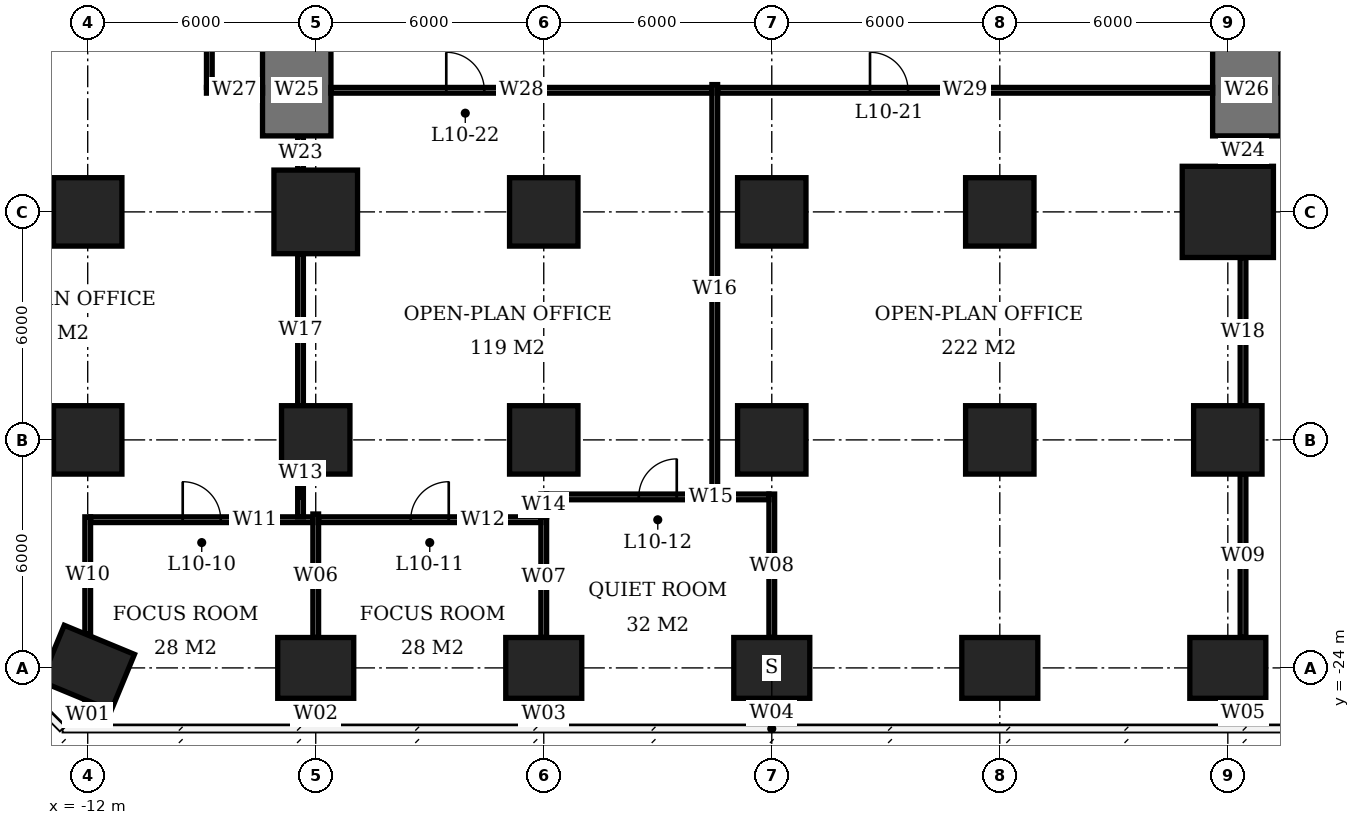
"""IFC4 building model, lengths in metres.
Left out: names, types, materials, properties, quantities, classifications, styles, units other than length and angle.
Written with IfcOpenShell. Run it as: python <this file> out.ifc"""

import sys

from ifc_helpers import new_model, si_unit, direction, frame, frame_2d, origin, origin_2d, place, context, subcontext, project, spatial, rectangle, extrude, element, fill, save


model = new_model("IFC4")
c1 = context("Model", 3, precision=1e-05, world=origin(), true_north=direction((0.0, 1.0)))
c2 = subcontext(c1, "Body", "Model", "MODEL_VIEW")
j1 = project(units=[si_unit("LENGTHUNIT", "METRE"), si_unit("PLANEANGLEUNIT", "RADIAN")], contexts=[c1])
p1 = place(None, origin())
s1 = spatial("IfcSite", under=j1, at=p1, CompositionType="ELEMENT")
p2 = place(p1, origin())
s2 = spatial("IfcBuilding", under=s1, at=p2, CompositionType="ELEMENT")
p3 = place(p2, frame((0.0, 0.0, 45.5)))
s3 = spatial("IfcBuildingStorey", under=s2, at=p3, CompositionType="ELEMENT", Elevation=45.5)
p4 = place(p3, frame((-12.0, -24.0, 0.0), z_axis=(0.0, 0.0, 1.0), x_axis=(-0.923879532511, 0.382683432365, 0.0)))
e1 = element("IfcColumn", 1, at=p4, inside=s3, PredefinedType="COLUMN", context=c2, shape_type="SweptSolid", body=[
    extrude(rectangle(XDim=2.0, YDim=1.6, at=origin_2d()), origin(), (0.0, 0.0, 1.0), 3.9),
])
for number, where, z_axis, x_axis in (
    (2, (-12.0, -18.0, 0.0), (0.0, 0.0, 1.0), (1.0, 0.0, 0.0)),
    (3, (-12.0, -12.0, 0.0), (0.0, 0.0, 1.0), (1.0, 0.0, 0.0)),
):
    element("IfcColumn", number, at=place(p3, frame(where, z_axis=z_axis, x_axis=x_axis)), inside=s3, PredefinedType="COLUMN", context=c2, shape_type="SweptSolid", body=[
        extrude(rectangle(XDim=1.8, YDim=1.8, at=origin_2d()), origin(), (0.0, 0.0, 1.0), 3.9),
    ])
p5 = place(p3, frame((-6.0, -24.0, 0.0), z_axis=(0.0, 0.0, 1.0), x_axis=(1.0, 0.0, 0.0)))
e4 = element("IfcColumn", 4, at=p5, inside=s3, PredefinedType="COLUMN", context=c2, shape_type="SweptSolid", body=[
    extrude(rectangle(XDim=2.0, YDim=1.6, at=origin_2d()), origin(), (0.0, 0.0, 1.0), 3.9),
])
p6 = place(p3, frame((-6.0, -18.0, 0.0), z_axis=(0.0, 0.0, 1.0), x_axis=(1.0, 0.0, 0.0)))
e5 = element("IfcColumn", 5, at=p6, inside=s3, PredefinedType="COLUMN", context=c2, shape_type="SweptSolid", body=[
    extrude(rectangle(XDim=1.8, YDim=1.8, at=origin_2d()), origin(), (0.0, 0.0, 1.0), 3.9),
])
p7 = place(p3, frame((-6.0, -12.0, 0.0), z_axis=(0.0, 0.0, 1.0), x_axis=(1.0, 0.0, 0.0)))
e6 = element("IfcColumn", 6, at=p7, inside=s3, PredefinedType="COLUMN", context=c2, shape_type="SweptSolid", body=[
    extrude(rectangle(XDim=2.2, YDim=2.2, at=origin_2d()), origin(), (0.0, 0.0, 1.0), 3.9),
])
p8 = place(p3, frame((0.0, -24.0, 0.0), z_axis=(0.0, 0.0, 1.0), x_axis=(1.0, 0.0, 0.0)))
e7 = element("IfcColumn", 7, at=p8, inside=s3, PredefinedType="COLUMN", context=c2, shape_type="SweptSolid", body=[
    extrude(rectangle(XDim=2.0, YDim=1.6, at=origin_2d()), origin(), (0.0, 0.0, 1.0), 3.9),
])
for number, where, z_axis, x_axis in (
    (8, (0.0, -18.0, 0.0), (0.0, 0.0, 1.0), (1.0, 0.0, 0.0)),
    (9, (0.0, -12.0, 0.0), (0.0, 0.0, 1.0), (1.0, 0.0, 0.0)),
):
    element("IfcColumn", number, at=place(p3, frame(where, z_axis=z_axis, x_axis=x_axis)), inside=s3, PredefinedType="COLUMN", context=c2, shape_type="SweptSolid", body=[
        extrude(rectangle(XDim=1.8, YDim=1.8, at=origin_2d()), origin(), (0.0, 0.0, 1.0), 3.9),
    ])
p9 = place(p3, frame((6.0, -24.0, 0.0), z_axis=(0.0, 0.0, 1.0), x_axis=(1.0, 0.0, 0.0)))
e10 = element("IfcColumn", 10, at=p9, inside=s3, PredefinedType="COLUMN", context=c2, shape_type="SweptSolid", body=[
    extrude(rectangle(XDim=2.0, YDim=1.6, at=origin_2d()), origin(), (0.0, 0.0, 1.0), 3.9),
])
for number, where, z_axis, x_axis in (
    (11, (6.0, -18.0, 0.0), (0.0, 0.0, 1.0), (1.0, 0.0, 0.0)),
    (12, (6.0, -12.0, 0.0), (0.0, 0.0, 1.0), (1.0, 0.0, 0.0)),
):
    element("IfcColumn", number, at=place(p3, frame(where, z_axis=z_axis, x_axis=x_axis)), inside=s3, PredefinedType="COLUMN", context=c2, shape_type="SweptSolid", body=[
        extrude(rectangle(XDim=1.8, YDim=1.8, at=origin_2d()), origin(), (0.0, 0.0, 1.0), 3.9),
    ])
p10 = place(p3, frame((12.0, -24.0, 0.0), z_axis=(0.0, 0.0, 1.0), x_axis=(1.0, 0.0, 0.0)))
e13 = element("IfcColumn", 13, at=p10, inside=s3, PredefinedType="COLUMN", context=c2, shape_type="SweptSolid", body=[
    extrude(rectangle(XDim=2.0, YDim=1.6, at=origin_2d()), origin(), (0.0, 0.0, 1.0), 3.9),
])
for number, where, z_axis, x_axis in (
    (14, (12.0, -18.0, 0.0), (0.0, 0.0, 1.0), (1.0, 0.0, 0.0)),
    (15, (12.0, -12.0, 0.0), (0.0, 0.0, 1.0), (1.0, 0.0, 0.0)),
):
    element("IfcColumn", number, at=place(p3, frame(where, z_axis=z_axis, x_axis=x_axis)), inside=s3, PredefinedType="COLUMN", context=c2, shape_type="SweptSolid", body=[
        extrude(rectangle(XDim=1.8, YDim=1.8, at=origin_2d()), origin(), (0.0, 0.0, 1.0), 3.9),
    ])
p11 = place(p3, frame((18.0, -24.0, 0.0), z_axis=(0.0, 0.0, 1.0), x_axis=(1.0, 0.0, 0.0)))
e16 = element("IfcColumn", 16, at=p11, inside=s3, PredefinedType="COLUMN", context=c2, shape_type="SweptSolid", body=[
    extrude(rectangle(XDim=2.0, YDim=1.6, at=origin_2d()), origin(), (0.0, 0.0, 1.0), 3.9),
])
p12 = place(p3, frame((18.0, -18.0, 0.0), z_axis=(0.0, 0.0, 1.0), x_axis=(1.0, 0.0, 0.0)))
e17 = element("IfcColumn", 17, at=p12, inside=s3, PredefinedType="COLUMN", context=c2, shape_type="SweptSolid", body=[
    extrude(rectangle(XDim=1.8, YDim=1.8, at=origin_2d()), origin(), (0.0, 0.0, 1.0), 3.9),
])
p13 = place(p3, frame((18.0, -12.0, 0.0), z_axis=(0.0, 0.0, 1.0), x_axis=(1.0, 0.0, 0.0)))
e18 = element("IfcColumn", 18, at=p13, inside=s3, PredefinedType="COLUMN", context=c2, shape_type="SweptSolid", body=[
    extrude(rectangle(XDim=2.4, YDim=2.4, at=origin_2d()), origin(), (0.0, 0.0, 1.0), 3.9),
])
for number, where, z_axis, x_axis in (
    (19, (-6.5, -10.0, 0.0), (0.0, 0.0, 1.0), (0.0, 1.0, 0.0)),
    (20, (18.5, -10.0, 0.0), (0.0, 0.0, 1.0), (0.0, 1.0, 0.0)),
):
    element("IfcWall", number, at=place(p3, frame(where, z_axis=z_axis, x_axis=x_axis)), inside=s3, PredefinedType="SHEAR", context=c2, shape_type="SweptSolid", body=[
        extrude(rectangle(XDim=2.4, YDim=1.8, at=frame_2d((1.2, 0.0))), origin(), (0.0, 0.0, 1.0), 3.9),
    ])
p14 = place(p3, frame((-11.925, -20.1, 0.0), z_axis=(0.0, 0.0, 1.0), x_axis=(1.0, 0.0, 0.0)))
e21 = element("IfcWall", 21, at=p14, inside=s3, PredefinedType="PARTITIONING", context=c2, shape_type="SweptSolid", body=[
    extrude(rectangle(XDim=5.85, YDim=0.15, at=frame_2d((2.925, 0.0))), origin(), (0.0, 0.0, 1.0), 3.65),
])
p15 = place(p14, frame((2.425, 0.0, 0.0)))
e22 = element("IfcOpeningElement", 22, at=p15, cuts=e21, PredefinedType="OPENING", context=c2, shape_type="SweptSolid", body=[
    extrude(rectangle(XDim=1.0, YDim=2.1, at=frame_2d((0.5, 1.05))), frame((0.0, 0.085, 0.0), z_axis=(0.0, -1.0, 0.0), x_axis=(1.0, 0.0, 0.0)), (0.0, 0.0, 1.0), 0.17),
])
p16 = place(p3, frame((-5.925, -20.1, 0.0), z_axis=(0.0, 0.0, 1.0), x_axis=(1.0, 0.0, 0.0)))
e23 = element("IfcWall", 23, at=p16, inside=s3, PredefinedType="PARTITIONING", context=c2, shape_type="SweptSolid", body=[
    extrude(rectangle(XDim=5.85, YDim=0.15, at=frame_2d((2.925, 0.0))), origin(), (0.0, 0.0, 1.0), 3.65),
])
p17 = place(p16, frame((2.425, 0.0, 0.0)))
e24 = element("IfcOpeningElement", 24, at=p17, cuts=e23, PredefinedType="OPENING", context=c2, shape_type="SweptSolid", body=[
    extrude(rectangle(XDim=1.0, YDim=2.1, at=frame_2d((0.5, 1.05))), frame((0.0, 0.085, 0.0), z_axis=(0.0, -1.0, 0.0), x_axis=(1.0, 0.0, 0.0)), (0.0, 0.0, 1.0), 0.17),
])
p18 = place(p3, frame((0.075, -19.5, 0.0), z_axis=(0.0, 0.0, 1.0), x_axis=(1.0, 0.0, 0.0)))
e25 = element("IfcWall", 25, at=p18, inside=s3, PredefinedType="PARTITIONING", context=c2, shape_type="SweptSolid", body=[
    extrude(rectangle(XDim=5.85, YDim=0.15, at=frame_2d((2.925, 0.0))), origin(), (0.0, 0.0, 1.0), 3.65),
])
p19 = place(p18, frame((2.425, 0.0, 0.0)))
e26 = element("IfcOpeningElement", 26, at=p19, cuts=e25, PredefinedType="OPENING", context=c2, shape_type="SweptSolid", body=[
    extrude(rectangle(XDim=1.0, YDim=2.1, at=frame_2d((0.5, 1.05))), frame((0.0, 0.085, 0.0), z_axis=(0.0, -1.0, 0.0), x_axis=(1.0, 0.0, 0.0)), (0.0, 0.0, 1.0), 0.17),
])
p20 = place(p3, frame((-12.0, -25.6, 0.0), z_axis=(0.0, 0.0, 1.0), x_axis=(0.0, 1.0, 0.0)))
e27 = element("IfcWall", 27, at=p20, inside=s3, PredefinedType="PARTITIONING", context=c2, shape_type="SweptSolid", body=[
    extrude(rectangle(XDim=0.703, YDim=0.15, at=frame_2d((0.352, 0.0))), origin(), (0.0, 0.0, 1.0), 3.65),
])
p21 = place(p3, frame((-12.0, -23.103, 0.0), z_axis=(0.0, 0.0, 1.0), x_axis=(0.0, 1.0, 0.0)))
e28 = element("IfcWall", 28, at=p21, inside=s3, PredefinedType="PARTITIONING", context=c2, shape_type="SweptSolid", body=[
    extrude(rectangle(XDim=3.078, YDim=0.15, at=frame_2d((1.539, 0.0))), origin(), (0.0, 0.0, 1.0), 3.65),
])
p22 = place(p3, frame((-6.0, -25.6, 0.0), z_axis=(0.0, 0.0, 1.0), x_axis=(0.0, 1.0, 0.0)))
e29 = element("IfcWall", 29, at=p22, inside=s3, PredefinedType="PARTITIONING", context=c2, shape_type="SweptSolid", body=[
    extrude(rectangle(XDim=0.8, YDim=0.15, at=frame_2d((0.4, 0.0))), origin(), (0.0, 0.0, 1.0), 3.65),
])
p23 = place(p3, frame((-6.0, -23.2, 0.0), z_axis=(0.0, 0.0, 1.0), x_axis=(0.0, 1.0, 0.0)))
e30 = element("IfcWall", 30, at=p23, inside=s3, PredefinedType="PARTITIONING", context=c2, shape_type="SweptSolid", body=[
    extrude(rectangle(XDim=3.25, YDim=0.15, at=frame_2d((1.625, 0.0))), origin(), (0.0, 0.0, 1.0), 3.65),
])
p24 = place(p3, frame((0.0, -25.6, 0.0), z_axis=(0.0, 0.0, 1.0), x_axis=(0.0, 1.0, 0.0)))
e31 = element("IfcWall", 31, at=p24, inside=s3, PredefinedType="PARTITIONING", context=c2, shape_type="SweptSolid", body=[
    extrude(rectangle(XDim=0.8, YDim=0.15, at=frame_2d((0.4, 0.0))), origin(), (0.0, 0.0, 1.0), 3.65),
])
p25 = place(p3, frame((0.0, -23.2, 0.0), z_axis=(0.0, 0.0, 1.0), x_axis=(0.0, 1.0, 0.0)))
e32 = element("IfcWall", 32, at=p25, inside=s3, PredefinedType="PARTITIONING", context=c2, shape_type="SweptSolid", body=[
    extrude(rectangle(XDim=3.175, YDim=0.15, at=frame_2d((1.587, 0.0))), origin(), (0.0, 0.0, 1.0), 3.65),
])
p26 = place(p3, frame((0.0, -20.025, 0.0), z_axis=(0.0, 0.0, 1.0), x_axis=(0.0, 1.0, 0.0)))
e33 = element("IfcWall", 33, at=p26, inside=s3, PredefinedType="PARTITIONING", context=c2, shape_type="SweptSolid", body=[
    extrude(rectangle(XDim=0.6, YDim=0.15, at=frame_2d((0.3, 0.0))), origin(), (0.0, 0.0, 1.0), 3.65),
])
p27 = place(p3, frame((6.0, -25.55, 0.0), z_axis=(0.0, 0.0, 1.0), x_axis=(0.0, 1.0, 0.0)))
e34 = element("IfcWall", 34, at=p27, inside=s3, PredefinedType="PARTITIONING", context=c2, shape_type="SweptSolid", body=[
    extrude(rectangle(XDim=0.75, YDim=0.15, at=frame_2d((0.375, 0.0))), origin(), (0.0, 0.0, 1.0), 3.65),
])
p28 = place(p3, frame((6.0, -23.2, 0.0), z_axis=(0.0, 0.0, 1.0), x_axis=(0.0, 1.0, 0.0)))
e35 = element("IfcWall", 35, at=p28, inside=s3, PredefinedType="PARTITIONING", context=c2, shape_type="SweptSolid", body=[
    extrude(rectangle(XDim=3.775, YDim=0.15, at=frame_2d((1.887, 0.0))), origin(), (0.0, 0.0, 1.0), 3.65),
])
p29 = place(p3, frame((-8.8, -8.725, 0.0), z_axis=(0.0, 0.0, 1.0), x_axis=(0.0, 1.0, 0.0)))
e36 = element("IfcWall", 36, at=p29, inside=s3, PredefinedType="PARTITIONING", context=c2, shape_type="SweptSolid", body=[
    extrude(rectangle(XDim=13.15, YDim=0.15, at=frame_2d((6.575, 0.0))), origin(), (0.0, 0.0, 1.0), 3.65),
])
p30 = place(p29, frame((4.08, 0.0, 0.0)))
e37 = element("IfcOpeningElement", 37, at=p30, cuts=e36, PredefinedType="OPENING", context=c2, shape_type="SweptSolid", body=[
    extrude(rectangle(XDim=1.0, YDim=2.1, at=frame_2d((0.5, 1.05))), frame((0.0, 0.085, 0.0), z_axis=(0.0, -1.0, 0.0), x_axis=(1.0, 0.0, 0.0)), (0.0, 0.0, 1.0), 0.17),
])
p31 = place(p3, frame((-8.875, -8.8, 0.0), z_axis=(0.0, 0.0, 1.0), x_axis=(1.0, 0.0, 0.0)))
e38 = element("IfcWall", 38, at=p31, inside=s3, PredefinedType="PARTITIONING", context=c2, shape_type="SweptSolid", body=[
    extrude(rectangle(XDim=1.475, YDim=0.15, at=frame_2d((0.738, 0.0))), origin(), (0.0, 0.0, 1.0), 3.65),
])
p32 = place(p3, frame((-6.4, -20.025, 0.0), z_axis=(0.0, 0.0, 1.0), x_axis=(0.0, 1.0, 0.0)))
e39 = element("IfcWall", 39, at=p32, inside=s3, PredefinedType="PARTITIONING", context=c2, shape_type="SweptSolid", body=[
    extrude(rectangle(XDim=1.125, YDim=0.15, at=frame_2d((0.562, 0.0))), origin(), (0.0, 0.0, 1.0), 3.65),
])
p33 = place(p3, frame((-6.4, -17.1, 0.0), z_axis=(0.0, 0.0, 1.0), x_axis=(0.0, 1.0, 0.0)))
e40 = element("IfcWall", 40, at=p33, inside=s3, PredefinedType="PARTITIONING", context=c2, shape_type="SweptSolid", body=[
    extrude(rectangle(XDim=4.0, YDim=0.15, at=frame_2d((2.0, 0.0))), origin(), (0.0, 0.0, 1.0), 3.65),
])
p34 = place(p3, frame((-6.4, -10.9, 0.0), z_axis=(0.0, 0.0, 1.0), x_axis=(0.0, 1.0, 0.0)))
e41 = element("IfcWall", 41, at=p34, inside=s3, PredefinedType="PARTITIONING", context=c2, shape_type="SweptSolid", body=[
    extrude(rectangle(XDim=0.9, YDim=0.15, at=frame_2d((0.45, 0.0))), origin(), (0.0, 0.0, 1.0), 3.65),
])
p35 = place(p3, frame((-5.6, -8.8, 0.0), z_axis=(0.0, 0.0, 1.0), x_axis=(1.0, 0.0, 0.0)))
e42 = element("IfcWall", 42, at=p35, inside=s3, PredefinedType="PARTITIONING", context=c2, shape_type="SweptSolid", body=[
    extrude(rectangle(XDim=10.025, YDim=0.15, at=frame_2d((5.013, 0.0))), origin(), (0.0, 0.0, 1.0), 3.65),
])
p36 = place(p35, frame((3.035, 0.0, 0.0)))
e43 = element("IfcOpeningElement", 43, at=p36, cuts=e42, PredefinedType="OPENING", context=c2, shape_type="SweptSolid", body=[
    extrude(rectangle(XDim=1.0, YDim=2.1, at=frame_2d((0.5, 1.05))), frame((0.0, 0.085, 0.0), z_axis=(0.0, -1.0, 0.0), x_axis=(1.0, 0.0, 0.0)), (0.0, 0.0, 1.0), 0.17),
])
p37 = place(p3, frame((4.5, -19.425, 0.0), z_axis=(0.0, 0.0, 1.0), x_axis=(0.0, 1.0, 0.0)))
e44 = element("IfcWall", 44, at=p37, inside=s3, PredefinedType="PARTITIONING", context=c2, shape_type="SweptSolid", body=[
    extrude(rectangle(XDim=10.775, YDim=0.15, at=frame_2d((5.388, 0.0))), origin(), (0.0, 0.0, 1.0), 3.65),
])
p38 = place(p3, frame((4.575, -8.8, 0.0), z_axis=(0.0, 0.0, 1.0), x_axis=(1.0, 0.0, 0.0)))
e45 = element("IfcWall", 45, at=p38, inside=s3, PredefinedType="PARTITIONING", context=c2, shape_type="SweptSolid", body=[
    extrude(rectangle(XDim=13.025, YDim=0.15, at=frame_2d((6.513, 0.0))), origin(), (0.0, 0.0, 1.0), 3.65),
])
p39 = place(p38, frame((4.01, 0.0, 0.0)))
e46 = element("IfcOpeningElement", 46, at=p39, cuts=e45, PredefinedType="OPENING", context=c2, shape_type="SweptSolid", body=[
    extrude(rectangle(XDim=1.0, YDim=2.1, at=frame_2d((0.5, 1.05))), frame((0.0, 0.085, 0.0), z_axis=(0.0, -1.0, 0.0), x_axis=(1.0, 0.0, 0.0)), (0.0, 0.0, 1.0), 0.17),
])
p40 = place(p3, frame((18.4, -25.55, 0.0), z_axis=(0.0, 0.0, 1.0), x_axis=(0.0, 1.0, 0.0)))
e47 = element("IfcWall", 47, at=p40, inside=s3, PredefinedType="PARTITIONING", context=c2, shape_type="SweptSolid", body=[
    extrude(rectangle(XDim=0.75, YDim=0.15, at=frame_2d((0.375, 0.0))), origin(), (0.0, 0.0, 1.0), 3.65),
])
p41 = place(p3, frame((18.4, -23.2, 0.0), z_axis=(0.0, 0.0, 1.0), x_axis=(0.0, 1.0, 0.0)))
e48 = element("IfcWall", 48, at=p41, inside=s3, PredefinedType="PARTITIONING", context=c2, shape_type="SweptSolid", body=[
    extrude(rectangle(XDim=4.3, YDim=0.15, at=frame_2d((2.15, 0.0))), origin(), (0.0, 0.0, 1.0), 3.65),
])
p42 = place(p3, frame((18.4, -17.1, 0.0), z_axis=(0.0, 0.0, 1.0), x_axis=(0.0, 1.0, 0.0)))
e49 = element("IfcWall", 49, at=p42, inside=s3, PredefinedType="PARTITIONING", context=c2, shape_type="SweptSolid", body=[
    extrude(rectangle(XDim=3.9, YDim=0.15, at=frame_2d((1.95, 0.0))), origin(), (0.0, 0.0, 1.0), 3.65),
])
p43 = place(p3, frame((18.4, -10.8, 0.0), z_axis=(0.0, 0.0, 1.0), x_axis=(0.0, 1.0, 0.0)))
e50 = element("IfcWall", 50, at=p43, inside=s3, PredefinedType="PARTITIONING", context=c2, shape_type="SweptSolid", body=[
    extrude(rectangle(XDim=0.8, YDim=0.15, at=frame_2d((0.4, 0.0))), origin(), (0.0, 0.0, 1.0), 3.65),
])
p44 = place(p15, origin())
e51 = element("IfcDoor", 51, at=p44, inside=s3, OperationType="SINGLE_SWING_LEFT", PredefinedType="DOOR", context=c2, shape_type="SweptSolid", body=[
    extrude(rectangle(XDim=1.0, YDim=2.1, at=frame_2d((0.5, 1.05))), frame((0.0, 0.025, 0.0), z_axis=(0.0, -1.0, 0.0), x_axis=(1.0, 0.0, 0.0)), (0.0, 0.0, 1.0), 0.05),
])
fill(e22, e51)
p45 = place(p17, origin())
e52 = element("IfcDoor", 52, at=p45, inside=s3, OperationType="SINGLE_SWING_RIGHT", PredefinedType="DOOR", context=c2, shape_type="SweptSolid", body=[
    extrude(rectangle(XDim=1.0, YDim=2.1, at=frame_2d((0.5, 1.05))), frame((0.0, 0.025, 0.0), z_axis=(0.0, -1.0, 0.0), x_axis=(1.0, 0.0, 0.0)), (0.0, 0.0, 1.0), 0.05),
])
fill(e24, e52)
p46 = place(p19, origin())
e53 = element("IfcDoor", 53, at=p46, inside=s3, OperationType="SINGLE_SWING_RIGHT", PredefinedType="DOOR", context=c2, shape_type="SweptSolid", body=[
    extrude(rectangle(XDim=1.0, YDim=2.1, at=frame_2d((0.5, 1.05))), frame((0.0, 0.025, 0.0), z_axis=(0.0, -1.0, 0.0), x_axis=(1.0, 0.0, 0.0)), (0.0, 0.0, 1.0), 0.05),
])
fill(e26, e53)
p47 = place(p39, origin())
e54 = element("IfcDoor", 54, at=p47, inside=s3, OperationType="SINGLE_SWING_LEFT", PredefinedType="DOOR", context=c2, shape_type="SweptSolid", body=[
    extrude(rectangle(XDim=1.0, YDim=2.1, at=frame_2d((0.5, 1.05))), frame((0.0, 0.025, 0.0), z_axis=(0.0, -1.0, 0.0), x_axis=(1.0, 0.0, 0.0)), (0.0, 0.0, 1.0), 0.05),
])
fill(e46, e54)
p48 = place(p36, origin())
e55 = element("IfcDoor", 55, at=p48, inside=s3, OperationType="SINGLE_SWING_LEFT", PredefinedType="DOOR", context=c2, shape_type="SweptSolid", body=[
    extrude(rectangle(XDim=1.0, YDim=2.1, at=frame_2d((0.5, 1.05))), frame((0.0, 0.025, 0.0), z_axis=(0.0, -1.0, 0.0), x_axis=(1.0, 0.0, 0.0)), (0.0, 0.0, 1.0), 0.05),
])
fill(e43, e55)
save(model, sys.argv[1])
